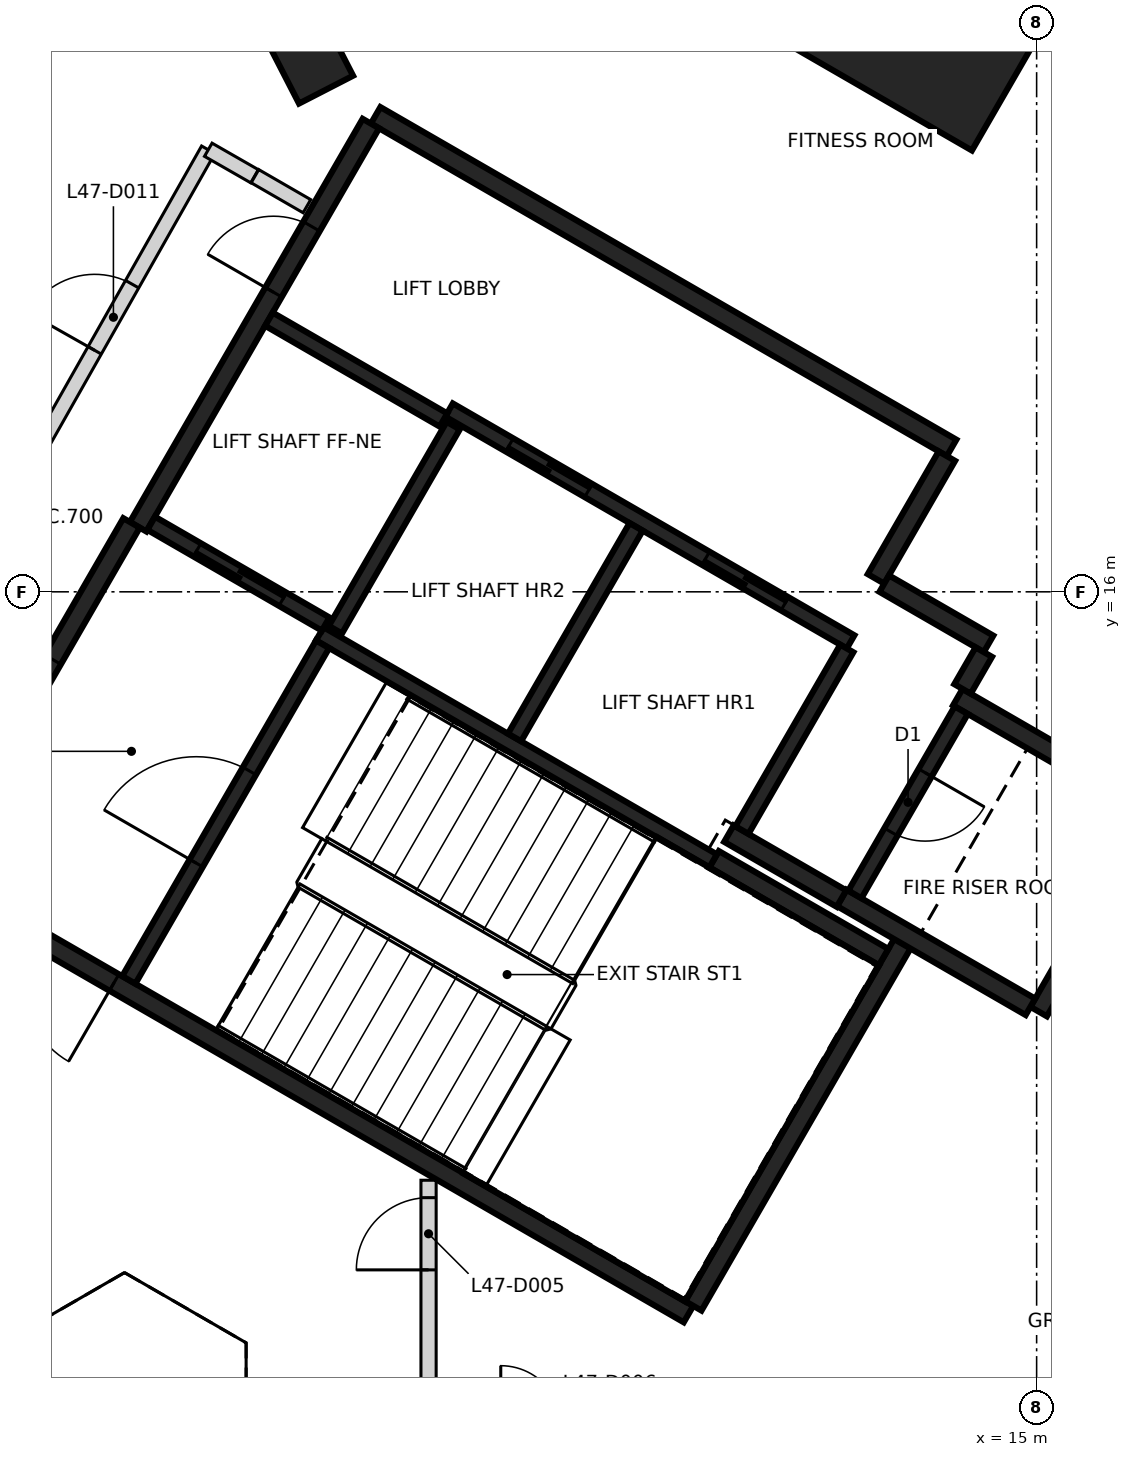
"""IFC4 building model, lengths in metres.
Left out: names, types, materials, properties, quantities, classifications, styles, units other than length and angle.
Written with IfcOpenShell. Run it as: python <this file> out.ifc"""

import sys

from ifc_helpers import new_model, si_unit, direction, frame, frame_2d, origin, origin_2d, place, context, subcontext, project, spatial, rectangle, extrude, element, fill, save


model = new_model("IFC4")
c1 = context("Model", 3, precision=1e-05, world=origin(), true_north=direction((0.0, 1.0)))
c2 = subcontext(c1, "Body", "Model", "MODEL_VIEW")
j1 = project(units=[si_unit("LENGTHUNIT", "METRE"), si_unit("PLANEANGLEUNIT", "RADIAN")], contexts=[c1])
p1 = place(None, origin())
s1 = spatial("IfcSite", under=j1, at=p1, CompositionType="ELEMENT")
p2 = place(p1, origin())
s2 = spatial("IfcBuilding", under=s1, at=p2, CompositionType="ELEMENT")
p3 = place(p2, frame((0.0, 0.0, 190.0)))
s3 = spatial("IfcBuildingStorey", under=s2, at=p3, CompositionType="ELEMENT", Elevation=190.0)
p4 = place(p3, frame((5.388, 23.118, -0.35), z_axis=(0.0, 0.0, 1.0), x_axis=(-0.457548042569, 0.889184901323, 0.0)))
e1 = element("IfcColumn", 1, at=p4, inside=s3, PredefinedType="COLUMN", context=c2, shape_type="SweptSolid", body=[
    extrude(rectangle(XDim=1.15, YDim=0.8, at=origin_2d()), origin(), (0.0, 0.0, 1.0), 3.6),
])
p5 = place(p3, frame((13.78, 23.867, -0.35), z_axis=(0.0, 0.0, 1.0), x_axis=(0.5, 0.866025403784, 0.0)))
e2 = element("IfcColumn", 2, at=p5, inside=s3, PredefinedType="COLUMN", context=c2, shape_type="SweptSolid", body=[
    extrude(rectangle(XDim=3.2, YDim=2.7, at=origin_2d()), origin(), (0.0, 0.0, 1.0), 3.6),
])
p6 = place(p3, frame((10.42, 6.498, 0.0), z_axis=(0.0, 0.0, 1.0), x_axis=(-0.866021906294, 0.500006057782, 0.0)))
e3 = element("IfcWall", 3, at=p6, inside=s3, PredefinedType="SHEAR", context=c2, shape_type="SweptSolid", body=[
    extrude(rectangle(XDim=11.55, YDim=0.25, at=frame_2d((5.775, 0.0))), origin(), (0.0, 0.0, 1.0), 3.25),
])
p7 = place(p6, frame((10.025, 0.0, 0.0)))
e4 = element("IfcOpeningElement", 4, at=p7, cuts=e3, PredefinedType="OPENING", context=c2, shape_type="SweptSolid", body=[
    extrude(rectangle(XDim=1.2, YDim=2.1, at=frame_2d((0.6, 1.05))), frame((0.0, 0.135, 0.0), z_axis=(0.0, -1.0, 0.0), x_axis=(1.0, 0.0, 0.0)), (0.0, 0.0, 1.0), 0.27),
])
p8 = place(p6, frame((8.725, 0.0, 0.0)))
e5 = element("IfcOpeningElement", 5, at=p8, cuts=e3, PredefinedType="OPENING", context=c2, shape_type="SweptSolid", body=[
    extrude(rectangle(XDim=1.2, YDim=2.1, at=frame_2d((0.6, 1.05))), frame((0.0, 0.135, 0.0), z_axis=(0.0, -1.0, 0.0), x_axis=(1.0, 0.0, 0.0)), (0.0, 0.0, 1.0), 0.27),
])
p9 = place(p3, frame((6.304, 22.269, 0.0), z_axis=(0.0, 0.0, 1.0), x_axis=(0.866022959057, -0.500004234368, 0.0)))
e6 = element("IfcWall", 6, at=p9, inside=s3, PredefinedType="SHEAR", context=c2, shape_type="SweptSolid", body=[
    extrude(rectangle(XDim=8.75, YDim=0.25, at=frame_2d((4.375, 0.0))), origin(), (0.0, 0.0, 1.0), 3.25),
])
p10 = place(p3, frame((3.179, 16.856, 0.0), z_axis=(0.0, 0.0, 1.0), x_axis=(0.500001955336, 0.866024274868, 0.0)))
e7 = element("IfcWall", 7, at=p10, inside=s3, PredefinedType="SHEAR", context=c2, shape_type="SweptSolid", body=[
    extrude(rectangle(XDim=6.125, YDim=0.25, at=frame_2d((3.062, 0.0))), origin(), (0.0, 0.0, 1.0), 3.25),
])
p11 = place(p10, frame((3.563, 0.0, 0.0)))
e8 = element("IfcOpeningElement", 8, at=p11, cuts=e7, PredefinedType="OPENING", context=c2, shape_type="SweptSolid", body=[
    extrude(rectangle(XDim=1.0, YDim=2.1, at=frame_2d((0.5, 1.05))), frame((0.0, 0.135, 0.0), z_axis=(0.0, -1.0, 0.0), x_axis=(1.0, 0.0, 0.0)), (0.0, 0.0, 1.0), 0.27),
])
p12 = place(p3, frame((0.48, 12.381, 0.0), z_axis=(0.0, 0.0, 1.0), x_axis=(0.49999885962, 0.866026062182, 0.0)))
e9 = element("IfcWall", 9, at=p12, inside=s3, PredefinedType="SHEAR", context=c2, shape_type="SweptSolid", body=[
    extrude(rectangle(XDim=5.225, YDim=0.25, at=frame_2d((2.612, 0.0))), origin(), (0.0, 0.0, 1.0), 3.25),
])
p13 = place(p12, frame((1.95, 0.0, 0.0)))
e10 = element("IfcOpeningElement", 10, at=p13, cuts=e9, PredefinedType="OPENING", context=c2, shape_type="SweptSolid", body=[
    extrude(rectangle(XDim=1.2, YDim=2.1, at=frame_2d((0.6, 1.05))), frame((0.0, 0.135, 0.0), z_axis=(0.0, -1.0, 0.0), x_axis=(1.0, 0.0, 0.0)), (0.0, 0.0, 1.0), 0.27),
])
p14 = place(p3, frame((13.238, 11.378, 0.0), z_axis=(0.0, 0.0, 1.0), x_axis=(-0.500008851346, -0.866020293397, 0.0)))
e11 = element("IfcWall", 11, at=p14, inside=s3, PredefinedType="SHEAR", context=c2, shape_type="SweptSolid", body=[
    extrude(rectangle(XDim=5.51, YDim=0.25, at=frame_2d((2.755, 0.0))), origin(), (0.0, 0.0, 1.0), 3.25),
])
p15 = place(p3, frame((16.552, 13.119, 0.0), z_axis=(0.0, 0.0, 1.0), x_axis=(-0.499978833458, -0.866037623948, 0.0)))
e12 = element("IfcWall", 12, at=p15, inside=s3, PredefinedType="SHEAR", context=c2, shape_type="SweptSolid", body=[
    extrude(rectangle(XDim=3.05, YDim=0.25, at=frame_2d((1.525, 0.0))), origin(), (0.0, 0.0, 1.0), 3.25),
])
p16 = place(p3, frame((14.918, 10.54, 0.0), z_axis=(0.0, 0.0, 1.0), x_axis=(-0.866063538972, 0.499933942099, 0.0)))
e13 = element("IfcWall", 13, at=p16, inside=s3, PredefinedType="SHEAR", context=c2, shape_type="SweptSolid", body=[
    extrude(rectangle(XDim=2.865, YDim=0.25, at=frame_2d((1.432, 0.0))), origin(), (0.0, 0.0, 1.0), 3.25),
])
p17 = place(p3, frame((13.963, 14.614, 0.0), z_axis=(0.0, 0.0, 1.0), x_axis=(0.866042235819, -0.499970844928, 0.0)))
e14 = element("IfcWall", 14, at=p17, inside=s3, PredefinedType="SHEAR", context=c2, shape_type="SweptSolid", body=[
    extrude(rectangle(XDim=2.865, YDim=0.25, at=frame_2d((1.432, 0.0))), origin(), (0.0, 0.0, 1.0), 3.25),
])
p18 = place(p3, frame((10.757, 12.481, 0.0), z_axis=(0.0, 0.0, 1.0), x_axis=(0.866022940537, -0.500004266446, 0.0)))
e15 = element("IfcWall", 15, at=p18, inside=s3, PredefinedType="SHEAR", context=c2, shape_type="SweptSolid", body=[
    extrude(rectangle(XDim=2.575, YDim=0.25, at=frame_2d((1.287, 0.0))), origin(), (0.0, 0.0, 1.0), 3.25),
])
p19 = place(p3, frame((13.819, 17.785, 0.0), z_axis=(0.0, 0.0, 1.0), x_axis=(-0.500039802285, -0.866002422705, 0.0)))
e16 = element("IfcWall", 16, at=p19, inside=s3, PredefinedType="SHEAR", context=c2, shape_type="SweptSolid", body=[
    extrude(rectangle(XDim=1.865, YDim=0.25, at=frame_2d((0.932, 0.0))), origin(), (0.0, 0.0, 1.0), 3.25),
])
p20 = place(p3, frame((12.433, 11.964, 0.0), z_axis=(0.0, 0.0, 1.0), x_axis=(-0.866038183914, 0.499977863513, 0.0)))
e17 = element("IfcWall", 17, at=p20, inside=s3, PredefinedType="SHEAR", context=c2, shape_type="SweptSolid", body=[
    extrude(rectangle(XDim=1.71, YDim=0.25, at=frame_2d((0.855, 0.0))), origin(), (0.0, 0.0, 1.0), 3.25),
])
p21 = place(p3, frame((12.995, 16.108, 0.0), z_axis=(0.0, 0.0, 1.0), x_axis=(0.866044474677, -0.49996696679, 0.0)))
e18 = element("IfcWall", 18, at=p21, inside=s3, PredefinedType="SHEAR", context=c2, shape_type="SweptSolid", body=[
    extrude(rectangle(XDim=1.584, YDim=0.25, at=frame_2d((0.792, 0.0))), origin(), (0.0, 0.0, 1.0), 3.25),
])
p22 = place(p3, frame((14.305, 15.207, 0.0), z_axis=(0.0, 0.0, 1.0), x_axis=(-0.499848422343, -0.866112899501, 0.0)))
e19 = element("IfcWall", 19, at=p22, inside=s3, PredefinedType="SHEAR", context=c2, shape_type="SweptSolid", body=[
    extrude(rectangle(XDim=0.559, YDim=0.25, at=frame_2d((0.28, 0.0))), origin(), (0.0, 0.0, 1.0), 3.25),
])
p23 = place(p3, frame((12.552, 15.342, 0.0), z_axis=(0.0, 0.0, 1.0), x_axis=(-0.866030299012, 0.499991521122, 0.0)))
e20 = element("IfcWall", 20, at=p23, inside=s3, PredefinedType="SHEAR", context=c2, shape_type="SweptSolid", body=[
    extrude(rectangle(XDim=6.1, YDim=0.2, at=frame_2d((3.05, 0.0))), origin(), (0.0, 0.0, 1.0), 3.25),
])
p24 = place(p23, frame((1.0, 0.0, 0.0)))
e21 = element("IfcOpeningElement", 21, at=p24, cuts=e20, PredefinedType="OPENING", context=c2, shape_type="SweptSolid", body=[
    extrude(rectangle(XDim=1.2, YDim=2.1, at=frame_2d((0.6, 1.05))), frame((0.0, 0.11, 0.0), z_axis=(0.0, -1.0, 0.0), x_axis=(1.0, 0.0, 0.0)), (0.0, 0.0, 1.0), 0.22),
])
p25 = place(p23, frame((3.982, 0.0, 0.0)))
e22 = element("IfcOpeningElement", 22, at=p25, cuts=e20, PredefinedType="OPENING", context=c2, shape_type="SweptSolid", body=[
    extrude(rectangle(XDim=1.2, YDim=2.1, at=frame_2d((0.6, 1.05))), frame((0.0, 0.11, 0.0), z_axis=(0.0, -1.0, 0.0), x_axis=(1.0, 0.0, 0.0)), (0.0, 0.0, 1.0), 0.22),
])
p26 = place(p3, frame((10.743, 12.46, 0.0), z_axis=(0.0, 0.0, 1.0), x_axis=(-0.866018848283, 0.500011354289, 0.0)))
e23 = element("IfcWall", 23, at=p26, inside=s3, PredefinedType="SHEAR", context=c2, shape_type="SweptSolid", body=[
    extrude(rectangle(XDim=5.974, YDim=0.2, at=frame_2d((2.987, 0.0))), origin(), (0.0, 0.0, 1.0), 3.25),
])
p27 = place(p3, frame((3.057, 10.895, 0.0), z_axis=(0.0, 0.0, 1.0), x_axis=(0.500027839223, 0.866009330205, 0.0)))
e24 = element("IfcWall", 24, at=p27, inside=s3, PredefinedType="SHEAR", context=c2, shape_type="SweptSolid", body=[
    extrude(rectangle(XDim=5.098, YDim=0.2, at=frame_2d((2.549, 0.0))), origin(), (0.0, 0.0, 1.0), 3.25),
])
p28 = place(p27, frame((1.774, 0.0, 0.0)))
e25 = element("IfcOpeningElement", 25, at=p28, cuts=e24, PredefinedType="OPENING", context=c2, shape_type="SweptSolid", body=[
    extrude(rectangle(XDim=1.4, YDim=2.1, at=frame_2d((0.7, 1.05))), frame((0.0, 0.11, 0.0), z_axis=(0.0, -1.0, 0.0), x_axis=(1.0, 0.0, 0.0)), (0.0, 0.0, 1.0), 0.22),
])
p29 = place(p3, frame((8.132, 14.084, 0.0), z_axis=(0.0, 0.0, 1.0), x_axis=(0.500030834389, 0.86600760081, 0.0)))
e26 = element("IfcWall", 26, at=p29, inside=s3, PredefinedType="SHEAR", context=c2, shape_type="SweptSolid", body=[
    extrude(rectangle(XDim=3.198, YDim=0.2, at=frame_2d((1.599, 0.0))), origin(), (0.0, 0.0, 1.0), 3.25),
])
p30 = place(p3, frame((14.008, 14.442, 0.0), z_axis=(0.0, 0.0, 1.0), x_axis=(-0.499986818241, -0.866033014143, 0.0)))
e27 = element("IfcWall", 27, at=p30, inside=s3, PredefinedType="SHEAR", context=c2, shape_type="SweptSolid", body=[
    extrude(rectangle(XDim=2.798, YDim=0.2, at=frame_2d((1.399, 0.0))), origin(), (0.0, 0.0, 1.0), 3.25),
])
p31 = place(p30, frame((0.949, 0.0, 0.0)))
e28 = element("IfcOpeningElement", 28, at=p31, cuts=e27, PredefinedType="OPENING", context=c2, shape_type="SweptSolid", body=[
    extrude(rectangle(XDim=0.9, YDim=2.1, at=frame_2d((0.45, 1.05))), frame((0.0, 0.11, 0.0), z_axis=(0.0, -1.0, 0.0), x_axis=(1.0, 0.0, 0.0)), (0.0, 0.0, 1.0), 0.22),
])
p32 = place(p3, frame((12.502, 15.255, 0.0), z_axis=(0.0, 0.0, 1.0), x_axis=(-0.499965018551, -0.866045599391, 0.0)))
e29 = element("IfcWall", 29, at=p32, inside=s3, PredefinedType="SHEAR", context=c2, shape_type="SweptSolid", body=[
    extrude(rectangle(XDim=2.759, YDim=0.2, at=frame_2d((1.379, 0.0))), origin(), (0.0, 0.0, 1.0), 3.25),
])
p33 = place(p3, frame((7.324, 18.187, 0.0), z_axis=(0.0, 0.0, 1.0), x_axis=(-0.499967891604, -0.866043940782, 0.0)))
e30 = element("IfcWall", 30, at=p33, inside=s3, PredefinedType="SHEAR", context=c2, shape_type="SweptSolid", body=[
    extrude(rectangle(XDim=3.1, YDim=0.2, at=frame_2d((1.55, 0.0))), origin(), (0.0, 0.0, 1.0), 3.25),
])
p34 = place(p3, frame((5.646, 15.576, 0.0), z_axis=(0.0, 0.0, 1.0), x_axis=(-0.866018407898, 0.500012117035, 0.0)))
e31 = element("IfcWall", 31, at=p34, inside=s3, PredefinedType="SHEAR", context=c2, shape_type="SweptSolid", body=[
    extrude(rectangle(XDim=2.651, YDim=0.2, at=frame_2d((1.325, 0.0))), origin(), (0.0, 0.0, 1.0), 3.25),
])
p35 = place(p34, frame((0.652, 0.0, 0.0)))
e32 = element("IfcOpeningElement", 32, at=p35, cuts=e31, PredefinedType="OPENING", context=c2, shape_type="SweptSolid", body=[
    extrude(rectangle(XDim=1.3, YDim=2.1, at=frame_2d((0.65, 1.05))), frame((0.0, 0.11, 0.0), z_axis=(0.0, -1.0, 0.0), x_axis=(1.0, 0.0, 0.0)), (0.0, 0.0, 1.0), 0.22),
])
p36 = place(p3, frame((7.196, 18.26, 0.0), z_axis=(0.0, 0.0, 1.0), x_axis=(-0.866018407898, 0.500012117035, 0.0)))
e33 = element("IfcWall", 33, at=p36, inside=s3, PredefinedType="SHEAR", context=c2, shape_type="SweptSolid", body=[
    extrude(rectangle(XDim=2.651, YDim=0.2, at=frame_2d((1.325, 0.0))), origin(), (0.0, 0.0, 1.0), 3.25),
])
p37 = place(p3, frame((-1.085, 12.65, 0.0), z_axis=(0.0, 0.0, 1.0), x_axis=(0.49243456751, 0.870349468157, 0.0)))
e34 = element("IfcWall", 34, at=p37, inside=s3, PredefinedType="PARTITIONING", context=c2, shape_type="SweptSolid", body=[
    extrude(rectangle(XDim=10.531, YDim=0.2, at=frame_2d((5.266, 0.0))), origin(), (0.0, 0.0, 1.0), 3.25),
])
p38 = place(p37, frame((7.499, 0.0, 0.0)))
e35 = element("IfcOpeningElement", 35, at=p38, cuts=e34, PredefinedType="OPENING", context=c2, shape_type="SweptSolid", body=[
    extrude(rectangle(XDim=1.0, YDim=2.1, at=frame_2d((0.5, 1.05))), frame((0.0, 0.11, 0.0), z_axis=(0.0, -1.0, 0.0), x_axis=(1.0, 0.0, 0.0)), (0.0, 0.0, 1.0), 0.22),
])
p39 = place(p3, frame((4.102, 21.816, 0.0), z_axis=(0.0, 0.0, 1.0), x_axis=(0.867664502326, -0.497150189986, 0.0)))
e36 = element("IfcWall", 36, at=p39, inside=s3, PredefinedType="PARTITIONING", context=c2, shape_type="SweptSolid", body=[
    extrude(rectangle(XDim=0.702, YDim=0.2, at=frame_2d((0.351, 0.0))), origin(), (0.0, 0.0, 1.0), 3.25),
])
p40 = place(p3, frame((4.716, 21.468, 0.0), z_axis=(0.0, 0.0, 1.0), x_axis=(0.865912682783, -0.500195187698, 0.0)))
e37 = element("IfcWall", 37, at=p40, inside=s3, PredefinedType="PARTITIONING", context=c2, shape_type="SweptSolid", body=[
    extrude(rectangle(XDim=0.79, YDim=0.2, at=frame_2d((0.395, 0.0))), origin(), (0.0, 0.0, 1.0), 3.25),
])
p41 = place(p3, frame((7.0, -4.966, 0.0), z_axis=(0.0, 0.0, 1.0), x_axis=(0.0, 1.0, 0.0)))
e38 = element("IfcWall", 38, at=p41, inside=s3, PredefinedType="PARTITIONING", context=c2, shape_type="SweptSolid", body=[
    extrude(rectangle(XDim=13.225, YDim=0.2, at=frame_2d((6.612, 0.0))), origin(), (0.0, 0.0, 1.0), 3.25),
])
p42 = place(p41, frame((2.835, 0.0, 0.0)))
e39 = element("IfcOpeningElement", 39, at=p42, cuts=e38, PredefinedType="OPENING", context=c2, shape_type="SweptSolid", body=[
    extrude(rectangle(XDim=1.0, YDim=2.1, at=frame_2d((0.5, 1.05))), frame((0.0, 0.11, 0.0), z_axis=(0.0, -1.0, 0.0), x_axis=(1.0, 0.0, 0.0)), (0.0, 0.0, 1.0), 0.22),
])
p43 = place(p41, frame((12.045, 0.0, 0.0)))
e40 = element("IfcOpeningElement", 40, at=p43, cuts=e38, PredefinedType="OPENING", context=c2, shape_type="SweptSolid", body=[
    extrude(rectangle(XDim=0.95, YDim=2.1, at=frame_2d((0.475, 1.05))), frame((0.0, 0.11, 0.0), z_axis=(0.0, -1.0, 0.0), x_axis=(1.0, 0.0, 0.0)), (0.0, 0.0, 1.0), 0.22),
])
p44 = place(p35, origin())
e41 = element("IfcDoor", 41, at=p44, inside=s3, OperationType="SLIDING_TO_RIGHT", PredefinedType="DOOR", context=c2, shape_type="SweptSolid", body=[
    extrude(rectangle(XDim=1.3, YDim=2.1, at=frame_2d((0.65, 1.05))), frame((0.0, 0.025, 0.0), z_axis=(0.0, -1.0, 0.0), x_axis=(1.0, 0.0, 0.0)), (0.0, 0.0, 1.0), 0.05),
])
fill(e32, e41)
p45 = place(p24, origin())
e42 = element("IfcDoor", 42, at=p45, inside=s3, OperationType="DOUBLE_DOOR_SLIDING", PredefinedType="DOOR", context=c2, shape_type="SweptSolid", body=[
    extrude(rectangle(XDim=1.2, YDim=2.1, at=frame_2d((0.6, 1.05))), frame((0.0, 0.025, 0.0), z_axis=(0.0, -1.0, 0.0), x_axis=(1.0, 0.0, 0.0)), (0.0, 0.0, 1.0), 0.05),
])
fill(e21, e42)
p46 = place(p25, origin())
e43 = element("IfcDoor", 43, at=p46, inside=s3, OperationType="DOUBLE_DOOR_SLIDING", PredefinedType="DOOR", context=c2, shape_type="SweptSolid", body=[
    extrude(rectangle(XDim=1.2, YDim=2.1, at=frame_2d((0.6, 1.05))), frame((0.0, 0.025, 0.0), z_axis=(0.0, -1.0, 0.0), x_axis=(1.0, 0.0, 0.0)), (0.0, 0.0, 1.0), 0.05),
])
fill(e22, e43)
p47 = place(p11, origin())
e44 = element("IfcDoor", 44, at=p47, inside=s3, OperationType="SINGLE_SWING_LEFT", PredefinedType="DOOR", context=c2, shape_type="SweptSolid", body=[
    extrude(rectangle(XDim=1.0, YDim=2.1, at=frame_2d((0.5, 1.05))), frame((0.0, 0.025, 0.0), z_axis=(0.0, -1.0, 0.0), x_axis=(1.0, 0.0, 0.0)), (0.0, 0.0, 1.0), 0.05),
])
fill(e8, e44)
p48 = place(p8, origin())
e45 = element("IfcDoor", 45, at=p48, inside=s3, OperationType="SINGLE_SWING_RIGHT", PredefinedType="DOOR", context=c2, shape_type="SweptSolid", body=[
    extrude(rectangle(XDim=1.2, YDim=2.1, at=frame_2d((0.6, 1.05))), frame((0.0, 0.025, 0.0), z_axis=(0.0, -1.0, 0.0), x_axis=(1.0, 0.0, 0.0)), (0.0, 0.0, 1.0), 0.05),
])
fill(e5, e45)
p49 = place(p28, origin())
e46 = element("IfcDoor", 46, at=p49, inside=s3, OperationType="SINGLE_SWING_RIGHT", PredefinedType="DOOR", context=c2, shape_type="SweptSolid", body=[
    extrude(rectangle(XDim=1.4, YDim=2.1, at=frame_2d((0.7, 1.05))), frame((0.0, 0.025, 0.0), z_axis=(0.0, -1.0, 0.0), x_axis=(1.0, 0.0, 0.0)), (0.0, 0.0, 1.0), 0.05),
])
fill(e25, e46)
p50 = place(p31, origin())
e47 = element("IfcDoor", 47, at=p50, inside=s3, OperationType="SINGLE_SWING_LEFT", PredefinedType="DOOR", context=c2, shape_type="SweptSolid", body=[
    extrude(rectangle(XDim=0.9, YDim=2.1, at=frame_2d((0.45, 1.05))), frame((0.0, 0.025, 0.0), z_axis=(0.0, -1.0, 0.0), x_axis=(1.0, 0.0, 0.0)), (0.0, 0.0, 1.0), 0.05),
])
fill(e28, e47)
p51 = place(p13, origin())
e48 = element("IfcDoor", 48, at=p51, inside=s3, OperationType="SINGLE_SWING_LEFT", PredefinedType="DOOR", context=c2, shape_type="SweptSolid", body=[
    extrude(rectangle(XDim=1.2, YDim=2.1, at=frame_2d((0.6, 1.05))), frame((0.0, 0.025, 0.0), z_axis=(0.0, -1.0, 0.0), x_axis=(1.0, 0.0, 0.0)), (0.0, 0.0, 1.0), 0.05),
])
fill(e10, e48)
p52 = place(p43, frame((0.95, 0.0, 0.0), z_axis=(0.0, 0.0, 1.0), x_axis=(-1.0, 0.0, 0.0)))
e49 = element("IfcDoor", 49, at=p52, inside=s3, OperationType="SINGLE_SWING_LEFT", PredefinedType="DOOR", context=c2, shape_type="SweptSolid", body=[
    extrude(rectangle(XDim=0.95, YDim=2.1, at=frame_2d((0.475, 1.05))), frame((0.0, 0.025, 0.0), z_axis=(0.0, -1.0, 0.0), x_axis=(1.0, 0.0, 0.0)), (0.0, 0.0, 1.0), 0.05),
])
fill(e40, e49)
p53 = place(p38, frame((1.0, 0.0, 0.0), z_axis=(0.0, 0.0, 1.0), x_axis=(-1.0, 0.0, 0.0)))
e50 = element("IfcDoor", 50, at=p53, inside=s3, OperationType="SINGLE_SWING_LEFT", PredefinedType="DOOR", context=c2, shape_type="SweptSolid", body=[
    extrude(rectangle(XDim=1.0, YDim=2.1, at=frame_2d((0.5, 1.05))), frame((0.0, 0.025, 0.0), z_axis=(0.0, -1.0, 0.0), x_axis=(1.0, 0.0, 0.0)), (0.0, 0.0, 1.0), 0.05),
])
fill(e35, e50)
save(model, sys.argv[1])
